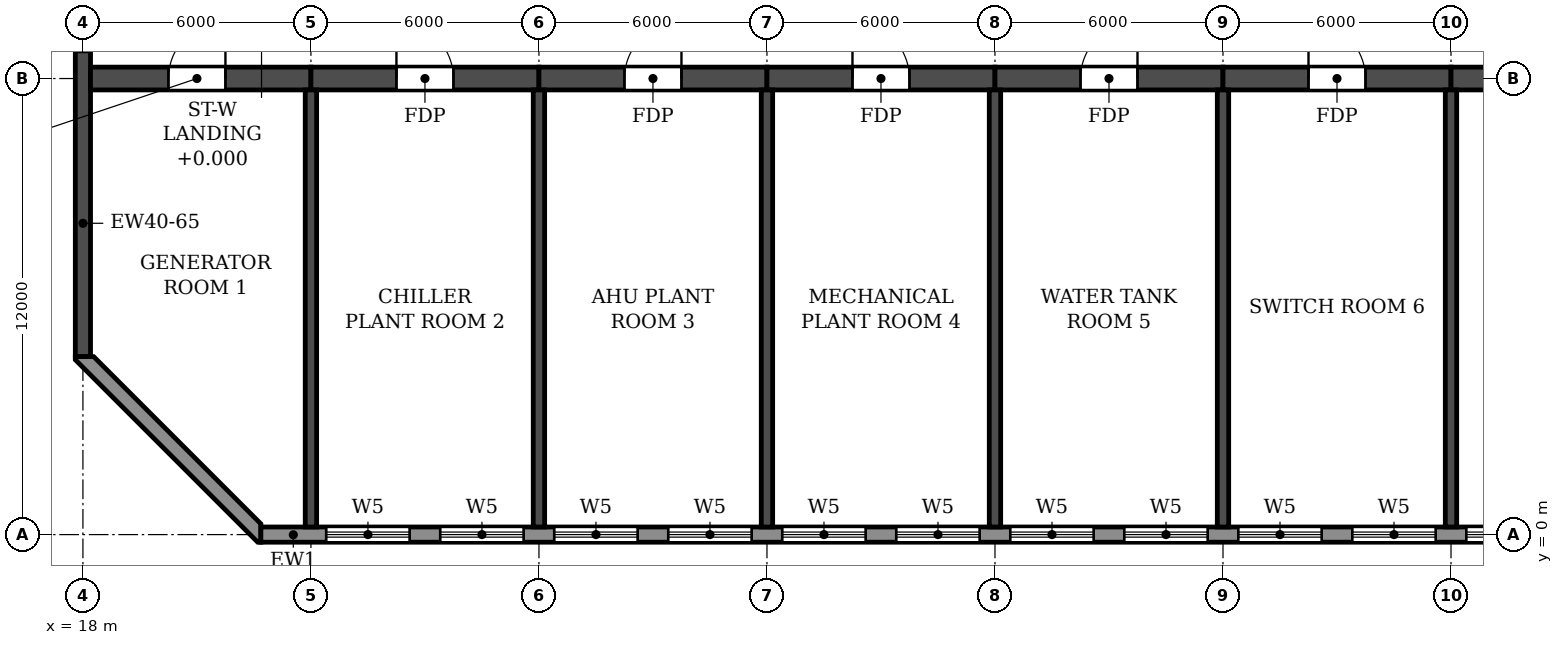
"""IFC4 building model, lengths in metres.
Left out: names, types, materials, properties, quantities, classifications, styles, units other than length and angle.
Written with IfcOpenShell. Run it as: python <this file> out.ifc"""

import sys

from ifc_helpers import new_model, si_unit, direction, frame, frame_2d, origin, place, context, subcontext, project, spatial, polyline, rectangle, outline, extrude, element, fill, save


model = new_model("IFC4")
c1 = context("Model", 3, precision=1e-05, world=origin(), true_north=direction((0.0, 1.0)))
c2 = subcontext(c1, "Body", "Model", "MODEL_VIEW")
j1 = project(units=[si_unit("LENGTHUNIT", "METRE"), si_unit("PLANEANGLEUNIT", "RADIAN")], contexts=[c1])
p1 = place(None, origin())
s1 = spatial("IfcSite", under=j1, at=p1, CompositionType="ELEMENT")
p2 = place(p1, origin())
s2 = spatial("IfcBuilding", under=s1, at=p2, CompositionType="ELEMENT")
p3 = place(p2, frame((0.0, 0.0, 165.3)))
s3 = spatial("IfcBuildingStorey", under=s2, at=p3, CompositionType="ELEMENT", Elevation=165.3)
for number, where, z_axis, x_axis in (
    (1, (24.0, 0.2, 0.0), (0.0, 0.0, 1.0), (0.0, 1.0, 0.0)),
    (2, (30.0, 0.2, 0.0), (0.0, 0.0, 1.0), (0.0, 1.0, 0.0)),
    (3, (36.0, 0.2, 0.0), (0.0, 0.0, 1.0), (0.0, 1.0, 0.0)),
    (4, (42.0, 0.2, 0.0), (0.0, 0.0, 1.0), (0.0, 1.0, 0.0)),
    (5, (48.0, 0.2, 0.0), (0.0, 0.0, 1.0), (0.0, 1.0, 0.0)),
    (6, (54.0, 0.2, 0.0), (0.0, 0.0, 1.0), (0.0, 1.0, 0.0)),
):
    element("IfcWall", number, at=place(p3, frame(where, z_axis=z_axis, x_axis=x_axis)), inside=s3, PredefinedType="SHEAR", context=c2, shape_type="SweptSolid", body=[
        extrude(rectangle(XDim=11.5, YDim=0.3, at=frame_2d((5.75, 0.0))), origin(), (0.0, 0.0, 1.0), 6.38),
    ])
p4 = place(p3, frame((18.0, 4.683, 0.0), z_axis=(0.0, 0.0, 1.0), x_axis=(0.0, 1.0, 0.0)))
e7 = element("IfcWall", 7, at=p4, inside=s3, PredefinedType="SHEAR", context=c2, shape_type="SweptSolid", body=[
    extrude(rectangle(XDim=33.034, YDim=0.4, at=frame_2d((16.517, 0.0))), origin(), (0.0, 0.0, 1.0), 6.38),
])
p5 = place(p4, frame((23.817, 0.0, 0.9)))
e8 = element("IfcOpeningElement", 8, at=p5, cuts=e7, PredefinedType="OPENING", context=c2, shape_type="SweptSolid", body=[
    extrude(rectangle(XDim=1.2, YDim=1.5, at=frame_2d((0.6, 0.75))), frame((0.0, 0.21, 0.0), z_axis=(0.0, -1.0, 0.0), x_axis=(1.0, 0.0, 0.0)), (0.0, 0.0, 1.0), 0.42),
])
p6 = place(p4, frame((8.017, 0.0, 0.9)))
e9 = element("IfcOpeningElement", 9, at=p6, cuts=e7, PredefinedType="OPENING", context=c2, shape_type="SweptSolid", body=[
    extrude(rectangle(XDim=1.2, YDim=1.5, at=frame_2d((0.6, 0.75))), frame((0.0, 0.21, 0.0), z_axis=(0.0, -1.0, 0.0), x_axis=(1.0, 0.0, 0.0)), (0.0, 0.0, 1.0), 0.42),
])
p7 = place(p4, frame((15.917, 0.0, 0.9)))
e10 = element("IfcOpeningElement", 10, at=p7, cuts=e7, PredefinedType="OPENING", context=c2, shape_type="SweptSolid", body=[
    extrude(rectangle(XDim=1.2, YDim=1.5, at=frame_2d((0.6, 0.75))), frame((0.0, 0.21, 0.0), z_axis=(0.0, -1.0, 0.0), x_axis=(1.0, 0.0, 0.0)), (0.0, 0.0, 1.0), 0.42),
])
p8 = place(p3, frame((18.2, 12.0, 0.0), z_axis=(0.0, 0.0, 1.0), x_axis=(1.0, 0.0, 0.0)))
e11 = element("IfcWall", 11, at=p8, inside=s3, PredefinedType="SHEAR", context=c2, shape_type="SweptSolid", body=[
    extrude(rectangle(XDim=5.8, YDim=0.6, at=frame_2d((2.9, 0.0))), origin(), (0.0, 0.0, 1.0), 6.38),
])
p9 = place(p8, frame((2.05, 0.0, 0.0)))
e12 = element("IfcOpeningElement", 12, at=p9, cuts=e11, PredefinedType="OPENING", context=c2, shape_type="SweptSolid", body=[
    extrude(rectangle(XDim=1.5, YDim=2.1, at=frame_2d((0.75, 1.05))), frame((0.0, 0.31, 0.0), z_axis=(0.0, -1.0, 0.0), x_axis=(1.0, 0.0, 0.0)), (0.0, 0.0, 1.0), 0.62),
])
p10 = place(p3, frame((24.0, 12.0, 0.0), z_axis=(0.0, 0.0, 1.0), x_axis=(1.0, 0.0, 0.0)))
e13 = element("IfcWall", 13, at=p10, inside=s3, PredefinedType="SHEAR", context=c2, shape_type="SweptSolid", body=[
    extrude(rectangle(XDim=6.0, YDim=0.6, at=frame_2d((3.0, 0.0))), origin(), (0.0, 0.0, 1.0), 6.38),
])
p11 = place(p10, frame((2.25, 0.0, 0.0)))
e14 = element("IfcOpeningElement", 14, at=p11, cuts=e13, PredefinedType="OPENING", context=c2, shape_type="SweptSolid", body=[
    extrude(rectangle(XDim=1.5, YDim=2.1, at=frame_2d((0.75, 1.05))), frame((0.0, 0.31, 0.0), z_axis=(0.0, -1.0, 0.0), x_axis=(1.0, 0.0, 0.0)), (0.0, 0.0, 1.0), 0.62),
])
p12 = place(p3, frame((30.0, 12.0, 0.0), z_axis=(0.0, 0.0, 1.0), x_axis=(1.0, 0.0, 0.0)))
e15 = element("IfcWall", 15, at=p12, inside=s3, PredefinedType="SHEAR", context=c2, shape_type="SweptSolid", body=[
    extrude(rectangle(XDim=6.0, YDim=0.6, at=frame_2d((3.0, 0.0))), origin(), (0.0, 0.0, 1.0), 6.38),
])
p13 = place(p12, frame((2.25, 0.0, 0.0)))
e16 = element("IfcOpeningElement", 16, at=p13, cuts=e15, PredefinedType="OPENING", context=c2, shape_type="SweptSolid", body=[
    extrude(rectangle(XDim=1.5, YDim=2.1, at=frame_2d((0.75, 1.05))), frame((0.0, 0.31, 0.0), z_axis=(0.0, -1.0, 0.0), x_axis=(1.0, 0.0, 0.0)), (0.0, 0.0, 1.0), 0.62),
])
p14 = place(p3, frame((36.0, 12.0, 0.0), z_axis=(0.0, 0.0, 1.0), x_axis=(1.0, 0.0, 0.0)))
e17 = element("IfcWall", 17, at=p14, inside=s3, PredefinedType="SHEAR", context=c2, shape_type="SweptSolid", body=[
    extrude(rectangle(XDim=6.0, YDim=0.6, at=frame_2d((3.0, 0.0))), origin(), (0.0, 0.0, 1.0), 6.38),
])
p15 = place(p14, frame((2.25, 0.0, 0.0)))
e18 = element("IfcOpeningElement", 18, at=p15, cuts=e17, PredefinedType="OPENING", context=c2, shape_type="SweptSolid", body=[
    extrude(rectangle(XDim=1.5, YDim=2.1, at=frame_2d((0.75, 1.05))), frame((0.0, 0.31, 0.0), z_axis=(0.0, -1.0, 0.0), x_axis=(1.0, 0.0, 0.0)), (0.0, 0.0, 1.0), 0.62),
])
p16 = place(p3, frame((42.0, 12.0, 0.0), z_axis=(0.0, 0.0, 1.0), x_axis=(1.0, 0.0, 0.0)))
e19 = element("IfcWall", 19, at=p16, inside=s3, PredefinedType="SHEAR", context=c2, shape_type="SweptSolid", body=[
    extrude(rectangle(XDim=6.0, YDim=0.6, at=frame_2d((3.0, 0.0))), origin(), (0.0, 0.0, 1.0), 6.38),
])
p17 = place(p16, frame((2.25, 0.0, 0.0)))
e20 = element("IfcOpeningElement", 20, at=p17, cuts=e19, PredefinedType="OPENING", context=c2, shape_type="SweptSolid", body=[
    extrude(rectangle(XDim=1.5, YDim=2.1, at=frame_2d((0.75, 1.05))), frame((0.0, 0.31, 0.0), z_axis=(0.0, -1.0, 0.0), x_axis=(1.0, 0.0, 0.0)), (0.0, 0.0, 1.0), 0.62),
])
p18 = place(p3, frame((48.0, 12.0, 0.0), z_axis=(0.0, 0.0, 1.0), x_axis=(1.0, 0.0, 0.0)))
e21 = element("IfcWall", 21, at=p18, inside=s3, PredefinedType="SHEAR", context=c2, shape_type="SweptSolid", body=[
    extrude(rectangle(XDim=6.0, YDim=0.6, at=frame_2d((3.0, 0.0))), origin(), (0.0, 0.0, 1.0), 6.38),
])
p19 = place(p18, frame((2.25, 0.0, 0.0)))
e22 = element("IfcOpeningElement", 22, at=p19, cuts=e21, PredefinedType="OPENING", context=c2, shape_type="SweptSolid", body=[
    extrude(rectangle(XDim=1.5, YDim=2.1, at=frame_2d((0.75, 1.05))), frame((0.0, 0.31, 0.0), z_axis=(0.0, -1.0, 0.0), x_axis=(1.0, 0.0, 0.0)), (0.0, 0.0, 1.0), 0.62),
])
p20 = place(p3, frame((54.0, 12.0, 0.0), z_axis=(0.0, 0.0, 1.0), x_axis=(1.0, 0.0, 0.0)))
e23 = element("IfcWall", 23, at=p20, inside=s3, PredefinedType="SHEAR", context=c2, shape_type="SweptSolid", body=[
    extrude(rectangle(XDim=6.0, YDim=0.6, at=frame_2d((3.0, 0.0))), origin(), (0.0, 0.0, 1.0), 6.38),
])
p21 = place(p20, frame((2.25, 0.0, 0.0)))
e24 = element("IfcOpeningElement", 24, at=p21, cuts=e23, PredefinedType="OPENING", context=c2, shape_type="SweptSolid", body=[
    extrude(rectangle(XDim=1.5, YDim=2.1, at=frame_2d((0.75, 1.05))), frame((0.0, 0.31, 0.0), z_axis=(0.0, -1.0, 0.0), x_axis=(1.0, 0.0, 0.0)), (0.0, 0.0, 1.0), 0.62),
])
p22 = place(p3, frame((22.683, 0.0, 0.0), z_axis=(0.0, 0.0, 1.0), x_axis=(1.0, 0.0, 0.0)))
e25 = element("IfcWall", 25, at=p22, inside=s3, PredefinedType="STANDARD", context=c2, shape_type="SweptSolid", body=[
    extrude(rectangle(XDim=56.634, YDim=0.4, at=frame_2d((28.317, 0.0))), origin(), (0.0, 0.0, 1.0), 6.38),
])
p23 = place(p22, frame((1.717, 0.0, 0.6)))
e26 = element("IfcOpeningElement", 26, at=p23, cuts=e25, PredefinedType="OPENING", context=c2, shape_type="SweptSolid", body=[
    extrude(rectangle(XDim=2.2, YDim=2.4, at=frame_2d((1.1, 1.2))), frame((0.0, 0.21, 0.0), z_axis=(0.0, -1.0, 0.0), x_axis=(1.0, 0.0, 0.0)), (0.0, 0.0, 1.0), 0.42),
])
p24 = place(p22, frame((4.717, 0.0, 0.6)))
e27 = element("IfcOpeningElement", 27, at=p24, cuts=e25, PredefinedType="OPENING", context=c2, shape_type="SweptSolid", body=[
    extrude(rectangle(XDim=2.2, YDim=2.4, at=frame_2d((1.1, 1.2))), frame((0.0, 0.21, 0.0), z_axis=(0.0, -1.0, 0.0), x_axis=(1.0, 0.0, 0.0)), (0.0, 0.0, 1.0), 0.42),
])
p25 = place(p22, frame((7.717, 0.0, 0.6)))
e28 = element("IfcOpeningElement", 28, at=p25, cuts=e25, PredefinedType="OPENING", context=c2, shape_type="SweptSolid", body=[
    extrude(rectangle(XDim=2.2, YDim=2.4, at=frame_2d((1.1, 1.2))), frame((0.0, 0.21, 0.0), z_axis=(0.0, -1.0, 0.0), x_axis=(1.0, 0.0, 0.0)), (0.0, 0.0, 1.0), 0.42),
])
p26 = place(p22, frame((10.717, 0.0, 0.6)))
e29 = element("IfcOpeningElement", 29, at=p26, cuts=e25, PredefinedType="OPENING", context=c2, shape_type="SweptSolid", body=[
    extrude(rectangle(XDim=2.2, YDim=2.4, at=frame_2d((1.1, 1.2))), frame((0.0, 0.21, 0.0), z_axis=(0.0, -1.0, 0.0), x_axis=(1.0, 0.0, 0.0)), (0.0, 0.0, 1.0), 0.42),
])
p27 = place(p22, frame((13.717, 0.0, 0.6)))
e30 = element("IfcOpeningElement", 30, at=p27, cuts=e25, PredefinedType="OPENING", context=c2, shape_type="SweptSolid", body=[
    extrude(rectangle(XDim=2.2, YDim=2.4, at=frame_2d((1.1, 1.2))), frame((0.0, 0.21, 0.0), z_axis=(0.0, -1.0, 0.0), x_axis=(1.0, 0.0, 0.0)), (0.0, 0.0, 1.0), 0.42),
])
p28 = place(p22, frame((16.717, 0.0, 0.6)))
e31 = element("IfcOpeningElement", 31, at=p28, cuts=e25, PredefinedType="OPENING", context=c2, shape_type="SweptSolid", body=[
    extrude(rectangle(XDim=2.2, YDim=2.4, at=frame_2d((1.1, 1.2))), frame((0.0, 0.21, 0.0), z_axis=(0.0, -1.0, 0.0), x_axis=(1.0, 0.0, 0.0)), (0.0, 0.0, 1.0), 0.42),
])
p29 = place(p22, frame((19.717, 0.0, 0.6)))
e32 = element("IfcOpeningElement", 32, at=p29, cuts=e25, PredefinedType="OPENING", context=c2, shape_type="SweptSolid", body=[
    extrude(rectangle(XDim=2.2, YDim=2.4, at=frame_2d((1.1, 1.2))), frame((0.0, 0.21, 0.0), z_axis=(0.0, -1.0, 0.0), x_axis=(1.0, 0.0, 0.0)), (0.0, 0.0, 1.0), 0.42),
])
p30 = place(p22, frame((22.717, 0.0, 0.6)))
e33 = element("IfcOpeningElement", 33, at=p30, cuts=e25, PredefinedType="OPENING", context=c2, shape_type="SweptSolid", body=[
    extrude(rectangle(XDim=2.2, YDim=2.4, at=frame_2d((1.1, 1.2))), frame((0.0, 0.21, 0.0), z_axis=(0.0, -1.0, 0.0), x_axis=(1.0, 0.0, 0.0)), (0.0, 0.0, 1.0), 0.42),
])
p31 = place(p22, frame((25.717, 0.0, 0.6)))
e34 = element("IfcOpeningElement", 34, at=p31, cuts=e25, PredefinedType="OPENING", context=c2, shape_type="SweptSolid", body=[
    extrude(rectangle(XDim=2.2, YDim=2.4, at=frame_2d((1.1, 1.2))), frame((0.0, 0.21, 0.0), z_axis=(0.0, -1.0, 0.0), x_axis=(1.0, 0.0, 0.0)), (0.0, 0.0, 1.0), 0.42),
])
p32 = place(p22, frame((28.717, 0.0, 0.6)))
e35 = element("IfcOpeningElement", 35, at=p32, cuts=e25, PredefinedType="OPENING", context=c2, shape_type="SweptSolid", body=[
    extrude(rectangle(XDim=2.2, YDim=2.4, at=frame_2d((1.1, 1.2))), frame((0.0, 0.21, 0.0), z_axis=(0.0, -1.0, 0.0), x_axis=(1.0, 0.0, 0.0)), (0.0, 0.0, 1.0), 0.42),
])
p33 = place(p22, frame((31.717, 0.0, 0.6)))
e36 = element("IfcOpeningElement", 36, at=p33, cuts=e25, PredefinedType="OPENING", context=c2, shape_type="SweptSolid", body=[
    extrude(rectangle(XDim=2.2, YDim=2.4, at=frame_2d((1.1, 1.2))), frame((0.0, 0.21, 0.0), z_axis=(0.0, -1.0, 0.0), x_axis=(1.0, 0.0, 0.0)), (0.0, 0.0, 1.0), 0.42),
])
p34 = place(p22, frame((34.717, 0.0, 0.6)))
e37 = element("IfcOpeningElement", 37, at=p34, cuts=e25, PredefinedType="OPENING", context=c2, shape_type="SweptSolid", body=[
    extrude(rectangle(XDim=2.2, YDim=2.4, at=frame_2d((1.1, 1.2))), frame((0.0, 0.21, 0.0), z_axis=(0.0, -1.0, 0.0), x_axis=(1.0, 0.0, 0.0)), (0.0, 0.0, 1.0), 0.42),
])
p35 = place(p22, frame((37.717, 0.0, 0.6)))
e38 = element("IfcOpeningElement", 38, at=p35, cuts=e25, PredefinedType="OPENING", context=c2, shape_type="SweptSolid", body=[
    extrude(rectangle(XDim=2.2, YDim=2.4, at=frame_2d((1.1, 1.2))), frame((0.0, 0.21, 0.0), z_axis=(0.0, -1.0, 0.0), x_axis=(1.0, 0.0, 0.0)), (0.0, 0.0, 1.0), 0.42),
])
p36 = place(p22, frame((40.717, 0.0, 0.6)))
e39 = element("IfcOpeningElement", 39, at=p36, cuts=e25, PredefinedType="OPENING", context=c2, shape_type="SweptSolid", body=[
    extrude(rectangle(XDim=2.2, YDim=2.4, at=frame_2d((1.1, 1.2))), frame((0.0, 0.21, 0.0), z_axis=(0.0, -1.0, 0.0), x_axis=(1.0, 0.0, 0.0)), (0.0, 0.0, 1.0), 0.42),
])
p37 = place(p22, frame((43.717, 0.0, 0.6)))
e40 = element("IfcOpeningElement", 40, at=p37, cuts=e25, PredefinedType="OPENING", context=c2, shape_type="SweptSolid", body=[
    extrude(rectangle(XDim=2.2, YDim=2.4, at=frame_2d((1.1, 1.2))), frame((0.0, 0.21, 0.0), z_axis=(0.0, -1.0, 0.0), x_axis=(1.0, 0.0, 0.0)), (0.0, 0.0, 1.0), 0.42),
])
p38 = place(p22, frame((46.717, 0.0, 0.6)))
e41 = element("IfcOpeningElement", 41, at=p38, cuts=e25, PredefinedType="OPENING", context=c2, shape_type="SweptSolid", body=[
    extrude(rectangle(XDim=2.2, YDim=2.4, at=frame_2d((1.1, 1.2))), frame((0.0, 0.21, 0.0), z_axis=(0.0, -1.0, 0.0), x_axis=(1.0, 0.0, 0.0)), (0.0, 0.0, 1.0), 0.42),
])
p39 = place(p22, frame((49.717, 0.0, 0.6)))
e42 = element("IfcOpeningElement", 42, at=p39, cuts=e25, PredefinedType="OPENING", context=c2, shape_type="SweptSolid", body=[
    extrude(rectangle(XDim=2.2, YDim=2.4, at=frame_2d((1.1, 1.2))), frame((0.0, 0.21, 0.0), z_axis=(0.0, -1.0, 0.0), x_axis=(1.0, 0.0, 0.0)), (0.0, 0.0, 1.0), 0.42),
])
p40 = place(p22, frame((52.717, 0.0, 0.6)))
e43 = element("IfcOpeningElement", 43, at=p40, cuts=e25, PredefinedType="OPENING", context=c2, shape_type="SweptSolid", body=[
    extrude(rectangle(XDim=2.2, YDim=2.4, at=frame_2d((1.1, 1.2))), frame((0.0, 0.21, 0.0), z_axis=(0.0, -1.0, 0.0), x_axis=(1.0, 0.0, 0.0)), (0.0, 0.0, 1.0), 0.42),
])
p41 = place(p3, origin())
e44 = element("IfcWall", 44, at=p41, inside=s3, PredefinedType="STANDARD", context=c2, shape_type="SweptSolid", body=[
    extrude(outline(polyline([(17.8, 4.683), (17.8, 4.6), (22.6, -0.2), (22.683, -0.2), (22.683, 0.283), (18.283, 4.683), (17.8, 4.683)])), origin(), (0.0, 0.0, 1.0), 6.38),
])
p42 = place(p23, origin())
e45 = element("IfcWindow", 45, at=p42, inside=s3, PartitioningType="TRIPLE_PANEL_HORIZONTAL", PredefinedType="WINDOW", context=c2, shape_type="SweptSolid", body=[
    extrude(rectangle(XDim=2.2, YDim=2.4, at=frame_2d((1.1, 1.2))), frame((0.0, 0.03, 0.0), z_axis=(0.0, -1.0, 0.0), x_axis=(1.0, 0.0, 0.0)), (0.0, 0.0, 1.0), 0.06),
])
fill(e26, e45)
p43 = place(p24, origin())
e46 = element("IfcWindow", 46, at=p43, inside=s3, PartitioningType="TRIPLE_PANEL_HORIZONTAL", PredefinedType="WINDOW", context=c2, shape_type="SweptSolid", body=[
    extrude(rectangle(XDim=2.2, YDim=2.4, at=frame_2d((1.1, 1.2))), frame((0.0, 0.03, 0.0), z_axis=(0.0, -1.0, 0.0), x_axis=(1.0, 0.0, 0.0)), (0.0, 0.0, 1.0), 0.06),
])
fill(e27, e46)
p44 = place(p25, origin())
e47 = element("IfcWindow", 47, at=p44, inside=s3, PartitioningType="TRIPLE_PANEL_HORIZONTAL", PredefinedType="WINDOW", context=c2, shape_type="SweptSolid", body=[
    extrude(rectangle(XDim=2.2, YDim=2.4, at=frame_2d((1.1, 1.2))), frame((0.0, 0.03, 0.0), z_axis=(0.0, -1.0, 0.0), x_axis=(1.0, 0.0, 0.0)), (0.0, 0.0, 1.0), 0.06),
])
fill(e28, e47)
p45 = place(p26, origin())
e48 = element("IfcWindow", 48, at=p45, inside=s3, PartitioningType="TRIPLE_PANEL_HORIZONTAL", PredefinedType="WINDOW", context=c2, shape_type="SweptSolid", body=[
    extrude(rectangle(XDim=2.2, YDim=2.4, at=frame_2d((1.1, 1.2))), frame((0.0, 0.03, 0.0), z_axis=(0.0, -1.0, 0.0), x_axis=(1.0, 0.0, 0.0)), (0.0, 0.0, 1.0), 0.06),
])
fill(e29, e48)
p46 = place(p27, origin())
e49 = element("IfcWindow", 49, at=p46, inside=s3, PartitioningType="TRIPLE_PANEL_HORIZONTAL", PredefinedType="WINDOW", context=c2, shape_type="SweptSolid", body=[
    extrude(rectangle(XDim=2.2, YDim=2.4, at=frame_2d((1.1, 1.2))), frame((0.0, 0.03, 0.0), z_axis=(0.0, -1.0, 0.0), x_axis=(1.0, 0.0, 0.0)), (0.0, 0.0, 1.0), 0.06),
])
fill(e30, e49)
p47 = place(p28, origin())
e50 = element("IfcWindow", 50, at=p47, inside=s3, PartitioningType="TRIPLE_PANEL_HORIZONTAL", PredefinedType="WINDOW", context=c2, shape_type="SweptSolid", body=[
    extrude(rectangle(XDim=2.2, YDim=2.4, at=frame_2d((1.1, 1.2))), frame((0.0, 0.03, 0.0), z_axis=(0.0, -1.0, 0.0), x_axis=(1.0, 0.0, 0.0)), (0.0, 0.0, 1.0), 0.06),
])
fill(e31, e50)
p48 = place(p29, origin())
e51 = element("IfcWindow", 51, at=p48, inside=s3, PartitioningType="TRIPLE_PANEL_HORIZONTAL", PredefinedType="WINDOW", context=c2, shape_type="SweptSolid", body=[
    extrude(rectangle(XDim=2.2, YDim=2.4, at=frame_2d((1.1, 1.2))), frame((0.0, 0.03, 0.0), z_axis=(0.0, -1.0, 0.0), x_axis=(1.0, 0.0, 0.0)), (0.0, 0.0, 1.0), 0.06),
])
fill(e32, e51)
p49 = place(p30, origin())
e52 = element("IfcWindow", 52, at=p49, inside=s3, PartitioningType="TRIPLE_PANEL_HORIZONTAL", PredefinedType="WINDOW", context=c2, shape_type="SweptSolid", body=[
    extrude(rectangle(XDim=2.2, YDim=2.4, at=frame_2d((1.1, 1.2))), frame((0.0, 0.03, 0.0), z_axis=(0.0, -1.0, 0.0), x_axis=(1.0, 0.0, 0.0)), (0.0, 0.0, 1.0), 0.06),
])
fill(e33, e52)
p50 = place(p31, origin())
e53 = element("IfcWindow", 53, at=p50, inside=s3, PartitioningType="TRIPLE_PANEL_HORIZONTAL", PredefinedType="WINDOW", context=c2, shape_type="SweptSolid", body=[
    extrude(rectangle(XDim=2.2, YDim=2.4, at=frame_2d((1.1, 1.2))), frame((0.0, 0.03, 0.0), z_axis=(0.0, -1.0, 0.0), x_axis=(1.0, 0.0, 0.0)), (0.0, 0.0, 1.0), 0.06),
])
fill(e34, e53)
p51 = place(p32, origin())
e54 = element("IfcWindow", 54, at=p51, inside=s3, PartitioningType="TRIPLE_PANEL_HORIZONTAL", PredefinedType="WINDOW", context=c2, shape_type="SweptSolid", body=[
    extrude(rectangle(XDim=2.2, YDim=2.4, at=frame_2d((1.1, 1.2))), frame((0.0, 0.03, 0.0), z_axis=(0.0, -1.0, 0.0), x_axis=(1.0, 0.0, 0.0)), (0.0, 0.0, 1.0), 0.06),
])
fill(e35, e54)
p52 = place(p33, origin())
e55 = element("IfcWindow", 55, at=p52, inside=s3, PartitioningType="TRIPLE_PANEL_HORIZONTAL", PredefinedType="WINDOW", context=c2, shape_type="SweptSolid", body=[
    extrude(rectangle(XDim=2.2, YDim=2.4, at=frame_2d((1.1, 1.2))), frame((0.0, 0.03, 0.0), z_axis=(0.0, -1.0, 0.0), x_axis=(1.0, 0.0, 0.0)), (0.0, 0.0, 1.0), 0.06),
])
fill(e36, e55)
p53 = place(p9, origin())
e56 = element("IfcDoor", 56, at=p53, inside=s3, OperationType="DOUBLE_DOOR_SINGLE_SWING", PredefinedType="DOOR", context=c2, shape_type="SweptSolid", body=[
    extrude(rectangle(XDim=1.5, YDim=2.1, at=frame_2d((0.75, 1.05))), frame((0.0, 0.025, 0.0), z_axis=(0.0, -1.0, 0.0), x_axis=(1.0, 0.0, 0.0)), (0.0, 0.0, 1.0), 0.05),
])
fill(e12, e56)
p54 = place(p11, origin())
e57 = element("IfcDoor", 57, at=p54, inside=s3, OperationType="DOUBLE_DOOR_SINGLE_SWING", PredefinedType="DOOR", context=c2, shape_type="SweptSolid", body=[
    extrude(rectangle(XDim=1.5, YDim=2.1, at=frame_2d((0.75, 1.05))), frame((0.0, 0.025, 0.0), z_axis=(0.0, -1.0, 0.0), x_axis=(1.0, 0.0, 0.0)), (0.0, 0.0, 1.0), 0.05),
])
fill(e14, e57)
p55 = place(p13, origin())
e58 = element("IfcDoor", 58, at=p55, inside=s3, OperationType="DOUBLE_DOOR_SINGLE_SWING", PredefinedType="DOOR", context=c2, shape_type="SweptSolid", body=[
    extrude(rectangle(XDim=1.5, YDim=2.1, at=frame_2d((0.75, 1.05))), frame((0.0, 0.025, 0.0), z_axis=(0.0, -1.0, 0.0), x_axis=(1.0, 0.0, 0.0)), (0.0, 0.0, 1.0), 0.05),
])
fill(e16, e58)
p56 = place(p15, origin())
e59 = element("IfcDoor", 59, at=p56, inside=s3, OperationType="DOUBLE_DOOR_SINGLE_SWING", PredefinedType="DOOR", context=c2, shape_type="SweptSolid", body=[
    extrude(rectangle(XDim=1.5, YDim=2.1, at=frame_2d((0.75, 1.05))), frame((0.0, 0.025, 0.0), z_axis=(0.0, -1.0, 0.0), x_axis=(1.0, 0.0, 0.0)), (0.0, 0.0, 1.0), 0.05),
])
fill(e18, e59)
p57 = place(p17, origin())
e60 = element("IfcDoor", 60, at=p57, inside=s3, OperationType="DOUBLE_DOOR_SINGLE_SWING", PredefinedType="DOOR", context=c2, shape_type="SweptSolid", body=[
    extrude(rectangle(XDim=1.5, YDim=2.1, at=frame_2d((0.75, 1.05))), frame((0.0, 0.025, 0.0), z_axis=(0.0, -1.0, 0.0), x_axis=(1.0, 0.0, 0.0)), (0.0, 0.0, 1.0), 0.05),
])
fill(e20, e60)
p58 = place(p19, origin())
e61 = element("IfcDoor", 61, at=p58, inside=s3, OperationType="DOUBLE_DOOR_SINGLE_SWING", PredefinedType="DOOR", context=c2, shape_type="SweptSolid", body=[
    extrude(rectangle(XDim=1.5, YDim=2.1, at=frame_2d((0.75, 1.05))), frame((0.0, 0.025, 0.0), z_axis=(0.0, -1.0, 0.0), x_axis=(1.0, 0.0, 0.0)), (0.0, 0.0, 1.0), 0.05),
])
fill(e22, e61)
save(model, sys.argv[1])
